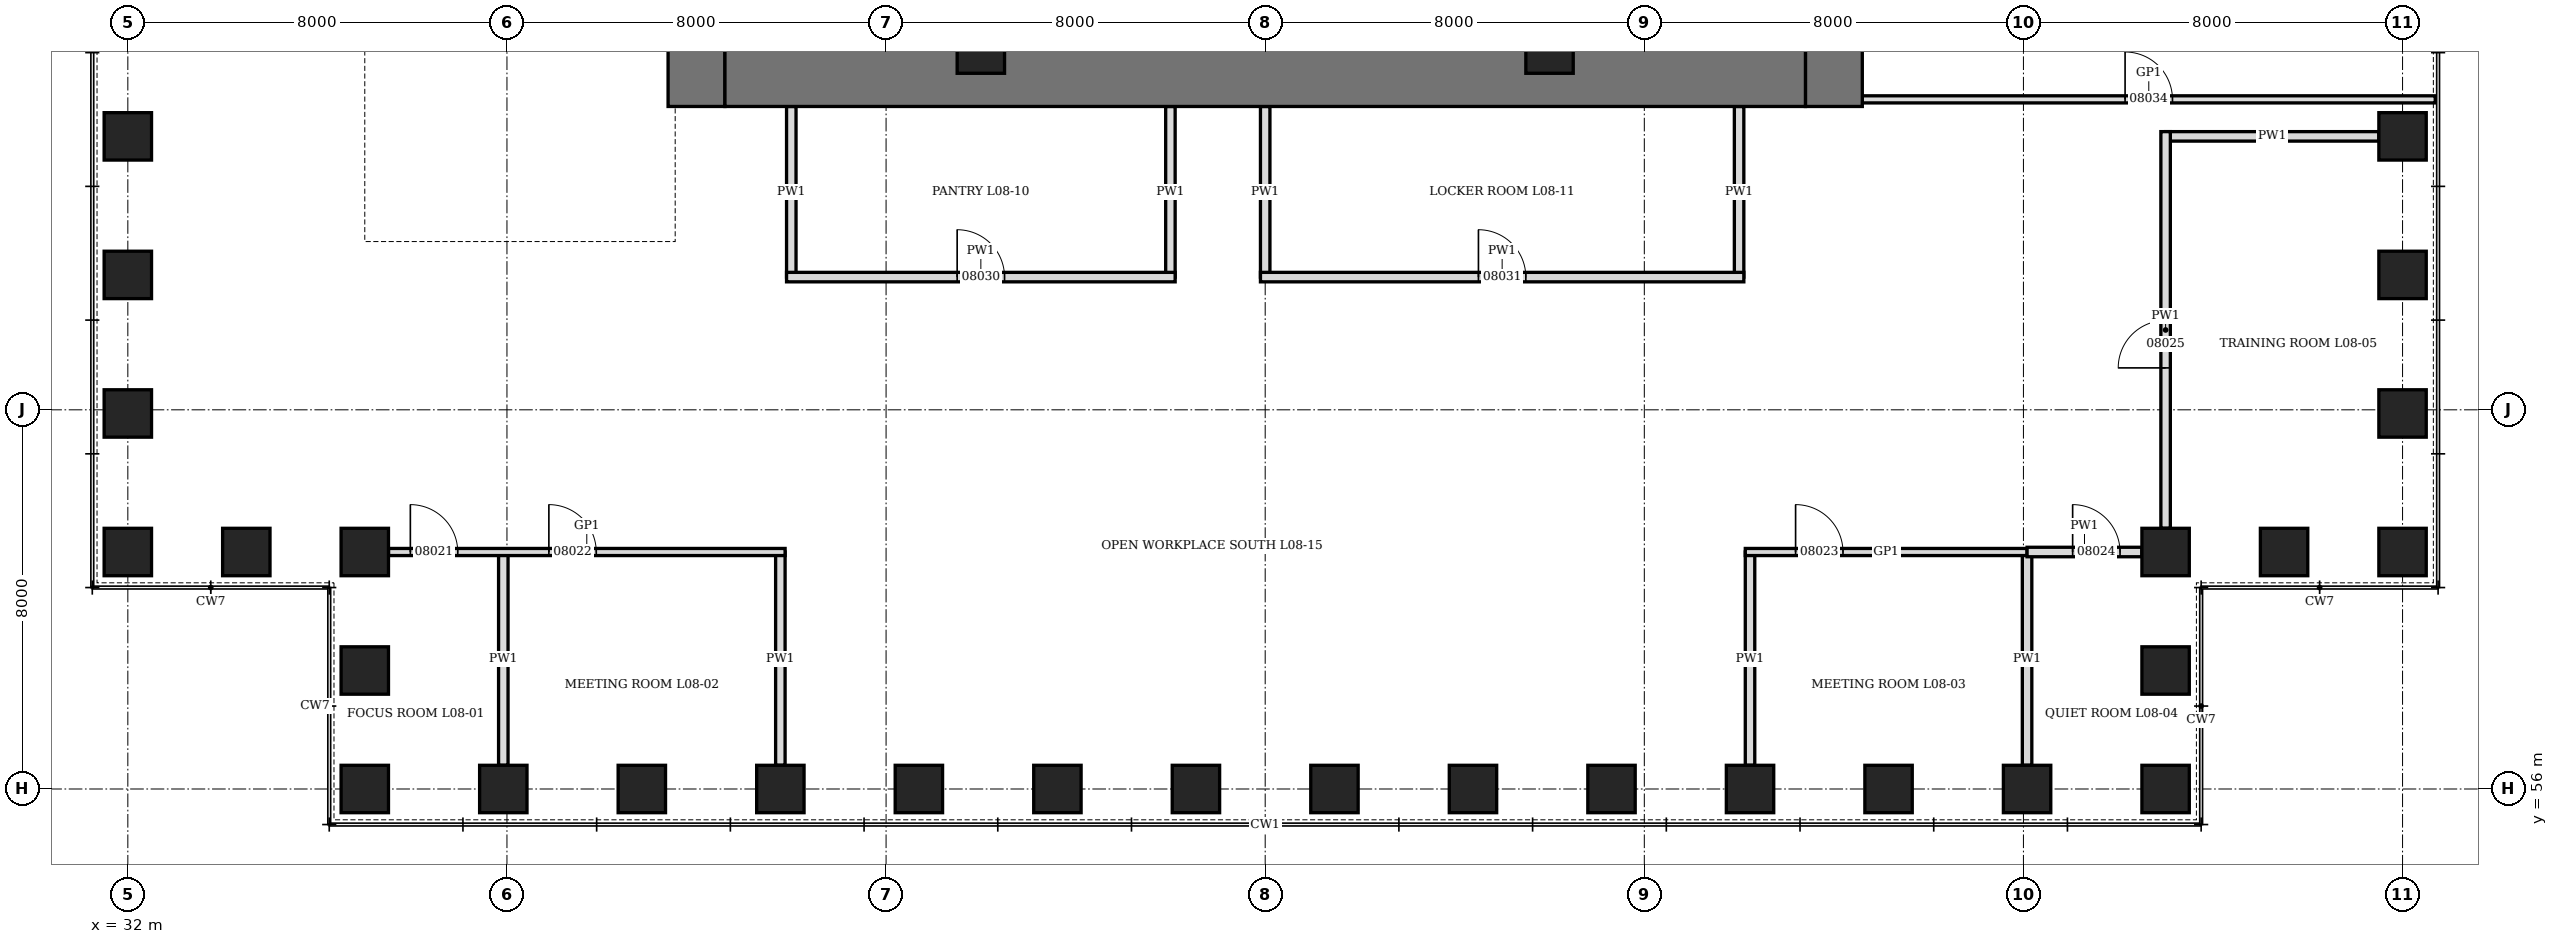
"""IFC4 building model, lengths in metres.
Left out: names, types, materials, properties, quantities, classifications, styles, units other than length and angle.
Written with IfcOpenShell. Run it as: python <this file> out.ifc"""

import sys

from ifc_helpers import new_model, si_unit, direction, frame, frame_2d, origin, origin_2d, place, context, subcontext, project, spatial, rectangle, hollow_rectangle, extrude, element, fill, save


model = new_model("IFC4")
c1 = context("Model", 3, precision=1e-05, world=origin(), true_north=direction((0.0, 1.0)))
c2 = subcontext(c1, "Body", "Model", "MODEL_VIEW")
j1 = project(units=[si_unit("LENGTHUNIT", "METRE"), si_unit("PLANEANGLEUNIT", "RADIAN")], contexts=[c1])
p1 = place(None, origin())
s1 = spatial("IfcSite", under=j1, at=p1, CompositionType="ELEMENT")
p2 = place(p1, origin())
s2 = spatial("IfcBuilding", under=s1, at=p2, CompositionType="ELEMENT")
p3 = place(p2, frame((0.0, 0.0, 43.3)))
s3 = spatial("IfcBuildingStorey", under=s2, at=p3, CompositionType="ELEMENT", Elevation=43.3)
for number, where, z_axis, x_axis in (
    (1, (37.0, 56.0, 0.0), (0.0, 0.0, 1.0), (1.0, 0.0, 0.0)),
    (2, (39.923, 56.0, 0.0), (0.0, 0.0, 1.0), (1.0, 0.0, 0.0)),
    (3, (42.846, 56.0, 0.0), (0.0, 0.0, 1.0), (1.0, 0.0, 0.0)),
    (4, (45.769, 56.0, 0.0), (0.0, 0.0, 1.0), (1.0, 0.0, 0.0)),
    (5, (48.692, 56.0, 0.0), (0.0, 0.0, 1.0), (1.0, 0.0, 0.0)),
    (6, (51.615, 56.0, 0.0), (0.0, 0.0, 1.0), (1.0, 0.0, 0.0)),
    (7, (54.539, 56.0, 0.0), (0.0, 0.0, 1.0), (1.0, 0.0, 0.0)),
    (8, (57.461, 56.0, 0.0), (0.0, 0.0, 1.0), (1.0, 0.0, 0.0)),
    (9, (60.385, 56.0, 0.0), (0.0, 0.0, 1.0), (1.0, 0.0, 0.0)),
    (10, (63.308, 56.0, 0.0), (0.0, 0.0, 1.0), (1.0, 0.0, 0.0)),
    (11, (66.231, 56.0, 0.0), (0.0, 0.0, 1.0), (1.0, 0.0, 0.0)),
    (12, (69.154, 56.0, 0.0), (0.0, 0.0, 1.0), (1.0, 0.0, 0.0)),
    (13, (72.077, 56.0, 0.0), (0.0, 0.0, 1.0), (1.0, 0.0, 0.0)),
    (14, (75.0, 56.0, 0.0), (0.0, 0.0, 1.0), (0.0, 1.0, 0.0)),
    (15, (75.0, 58.5, 0.0), (0.0, 0.0, 1.0), (0.0, 1.0, 0.0)),
    (16, (75.0, 61.0, 0.0), (0.0, 0.0, 1.0), (1.0, 0.0, 0.0)),
    (17, (77.5, 61.0, 0.0), (0.0, 0.0, 1.0), (1.0, 0.0, 0.0)),
    (18, (80.0, 61.0, 0.0), (0.0, 0.0, 1.0), (0.0, 1.0, 0.0)),
    (19, (80.0, 63.923, 0.0), (0.0, 0.0, 1.0), (0.0, 1.0, 0.0)),
    (20, (80.0, 66.846, 0.0), (0.0, 0.0, 1.0), (0.0, 1.0, 0.0)),
    (21, (80.0, 69.769, 0.0), (0.0, 0.0, 1.0), (0.0, 1.0, 0.0)),
    (22, (32.0, 69.769, 0.0), (0.0, 0.0, 1.0), (0.0, 1.0, 0.0)),
    (23, (32.0, 66.846, 0.0), (0.0, 0.0, 1.0), (0.0, 1.0, 0.0)),
    (24, (32.0, 63.923, 0.0), (0.0, 0.0, 1.0), (0.0, 1.0, 0.0)),
    (25, (32.0, 61.0, 0.0), (0.0, 0.0, 1.0), (1.0, 0.0, 0.0)),
    (26, (34.5, 61.0, 0.0), (0.0, 0.0, 1.0), (1.0, 0.0, 0.0)),
    (27, (37.0, 61.0, 0.0), (0.0, 0.0, 1.0), (0.0, 1.0, 0.0)),
    (28, (37.0, 58.5, 0.0), (0.0, 0.0, 1.0), (0.0, 1.0, 0.0)),
):
    element("IfcColumn", number, at=place(p3, frame(where, z_axis=z_axis, x_axis=x_axis)), inside=s3, PredefinedType="COLUMN", context=c2, shape_type="SweptSolid", body=[
        extrude(hollow_rectangle(XDim=1.0, YDim=1.0, WallThickness=0.25, at=origin_2d()), origin(), (0.0, 0.0, 1.0), 4.2),
    ])
p4 = place(p3, frame((44.0, 70.4, 0.0), z_axis=(0.0, 0.0, 1.0), x_axis=(0.0, 1.0, 0.0)))
e29 = element("IfcWall", 29, at=p4, inside=s3, PredefinedType="SHEAR", context=c2, shape_type="SweptSolid", body=[
    extrude(rectangle(XDim=19.2, YDim=1.2, at=frame_2d((9.6, 0.0))), origin(), (0.0, 0.0, 1.0), 4.2),
])
p5 = place(p4, frame((8.6, 0.0, 0.0)))
e30 = element("IfcOpeningElement", 30, at=p5, cuts=e29, PredefinedType="OPENING", context=c2, shape_type="SweptSolid", body=[
    extrude(rectangle(XDim=2.0, YDim=2.4, at=frame_2d((1.0, 1.2))), frame((0.0, 0.61, 0.0), z_axis=(0.0, -1.0, 0.0), x_axis=(1.0, 0.0, 0.0)), (0.0, 0.0, 1.0), 1.22),
])
p6 = place(p3, frame((68.0, 70.4, 0.0), z_axis=(0.0, 0.0, 1.0), x_axis=(0.0, 1.0, 0.0)))
e31 = element("IfcWall", 31, at=p6, inside=s3, PredefinedType="SHEAR", context=c2, shape_type="SweptSolid", body=[
    extrude(rectangle(XDim=19.2, YDim=1.2, at=frame_2d((9.6, 0.0))), origin(), (0.0, 0.0, 1.0), 4.2),
])
p7 = place(p6, frame((8.6, 0.0, 0.0)))
e32 = element("IfcOpeningElement", 32, at=p7, cuts=e31, PredefinedType="OPENING", context=c2, shape_type="SweptSolid", body=[
    extrude(rectangle(XDim=2.0, YDim=2.4, at=frame_2d((1.0, 1.2))), frame((0.0, 0.61, 0.0), z_axis=(0.0, -1.0, 0.0), x_axis=(1.0, 0.0, 0.0)), (0.0, 0.0, 1.0), 1.22),
])
p8 = place(p3, frame((44.6, 71.0, 0.0), z_axis=(0.0, 0.0, 1.0), x_axis=(1.0, 0.0, 0.0)))
e33 = element("IfcWall", 33, at=p8, inside=s3, PredefinedType="SHEAR", context=c2, shape_type="SweptSolid", body=[
    extrude(rectangle(XDim=22.8, YDim=1.2, at=frame_2d((11.4, 0.0))), origin(), (0.0, 0.0, 1.0), 4.2),
])
for number, where, z_axis, x_axis in (
    (34, (50.0, 71.6, 0.0), (0.0, 0.0, 1.0), (1.0, 0.0, 0.0)),
    (35, (62.0, 71.6, 0.0), (0.0, 0.0, 1.0), (1.0, 0.0, 0.0)),
):
    element("IfcColumn", number, at=place(p3, frame(where, z_axis=z_axis, x_axis=x_axis)), inside=s3, PredefinedType="COLUMN", context=c2, shape_type="SweptSolid", body=[
        extrude(hollow_rectangle(XDim=1.0, YDim=1.0, WallThickness=0.15, at=origin_2d()), origin(), (0.0, 0.0, 1.0), 4.2),
    ])
p9 = place(p3, frame((39.923, 56.5, 0.0), z_axis=(0.0, 0.0, 1.0), x_axis=(0.0, 1.0, 0.0)))
e36 = element("IfcWall", 36, at=p9, inside=s3, PredefinedType="PARTITIONING", context=c2, shape_type="SweptSolid", body=[
    extrude(rectangle(XDim=4.5, YDim=0.2, at=frame_2d((2.25, 0.0))), origin(), (0.0, 0.0, 1.0), 3.428),
])
for number, where, z_axis, x_axis in (
    (37, (45.769, 56.5, 0.0), (0.0, 0.0, 1.0), (0.0, 1.0, 0.0)),
    (38, (66.231, 56.5, 0.0), (0.0, 0.0, 1.0), (0.0, 1.0, 0.0)),
):
    element("IfcWall", number, at=place(p3, frame(where, z_axis=z_axis, x_axis=x_axis)), inside=s3, PredefinedType="PARTITIONING", context=c2, shape_type="SweptSolid", body=[
        extrude(rectangle(XDim=4.5, YDim=0.2, at=frame_2d((2.25, 0.0))), origin(), (0.0, 0.0, 1.0), 3.278),
    ])
for number, where, z_axis, x_axis in (
    (39, (72.077, 56.5, 0.0), (0.0, 0.0, 1.0), (0.0, 1.0, 0.0)),
    (40, (75.0, 69.769, 0.0), (0.0, 0.0, 1.0), (1.0, 0.0, 0.0)),
):
    element("IfcWall", number, at=place(p3, frame(where, z_axis=z_axis, x_axis=x_axis)), inside=s3, PredefinedType="PARTITIONING", context=c2, shape_type="SweptSolid", body=[
        extrude(rectangle(XDim=4.5, YDim=0.2, at=frame_2d((2.25, 0.0))), origin(), (0.0, 0.0, 1.0), 3.428),
    ])
for number, where, z_axis, x_axis in (
    (41, (46.0, 66.8, 0.0), (0.0, 0.0, 1.0), (0.0, 1.0, 0.0)),
    (42, (54.0, 66.8, 0.0), (0.0, 0.0, 1.0), (0.0, 1.0, 0.0)),
    (43, (56.0, 66.8, 0.0), (0.0, 0.0, 1.0), (0.0, 1.0, 0.0)),
    (44, (66.0, 66.8, 0.0), (0.0, 0.0, 1.0), (0.0, 1.0, 0.0)),
):
    element("IfcWall", number, at=place(p3, frame(where, z_axis=z_axis, x_axis=x_axis)), inside=s3, PredefinedType="PARTITIONING", context=c2, shape_type="SweptSolid", body=[
        extrude(rectangle(XDim=3.6, YDim=0.2, at=frame_2d((1.8, 0.0))), origin(), (0.0, 0.0, 1.0), 4.04),
    ])
p10 = place(p3, frame((37.5, 61.0, 0.0), z_axis=(0.0, 0.0, 1.0), x_axis=(1.0, 0.0, 0.0)))
e45 = element("IfcWall", 45, at=p10, inside=s3, PredefinedType="PARTITIONING", context=c2, shape_type="SweptSolid", body=[
    extrude(rectangle(XDim=8.369, YDim=0.15, at=frame_2d((4.185, 0.0))), origin(), (0.0, 0.0, 1.0), 4.04),
])
p11 = place(p10, frame((0.461, 0.0, 0.0)))
e46 = element("IfcOpeningElement", 46, at=p11, cuts=e45, PredefinedType="OPENING", context=c2, shape_type="SweptSolid", body=[
    extrude(rectangle(XDim=1.0, YDim=2.4, at=frame_2d((0.5, 1.2))), frame((0.0, 0.085, 0.0), z_axis=(0.0, -1.0, 0.0), x_axis=(1.0, 0.0, 0.0)), (0.0, 0.0, 1.0), 0.17),
])
p12 = place(p10, frame((3.385, 0.0, 0.0)))
e47 = element("IfcOpeningElement", 47, at=p12, cuts=e45, PredefinedType="OPENING", context=c2, shape_type="SweptSolid", body=[
    extrude(rectangle(XDim=1.0, YDim=2.4, at=frame_2d((0.5, 1.2))), frame((0.0, 0.085, 0.0), z_axis=(0.0, -1.0, 0.0), x_axis=(1.0, 0.0, 0.0)), (0.0, 0.0, 1.0), 0.17),
])
p13 = place(p3, frame((66.131, 61.0, 0.0), z_axis=(0.0, 0.0, 1.0), x_axis=(1.0, 0.0, 0.0)))
e48 = element("IfcWall", 48, at=p13, inside=s3, PredefinedType="PARTITIONING", context=c2, shape_type="SweptSolid", body=[
    extrude(rectangle(XDim=5.946, YDim=0.15, at=frame_2d((2.973, 0.0))), origin(), (0.0, 0.0, 1.0), 4.04),
])
p14 = place(p13, frame((1.062, 0.0, 0.0)))
e49 = element("IfcOpeningElement", 49, at=p14, cuts=e48, PredefinedType="OPENING", context=c2, shape_type="SweptSolid", body=[
    extrude(rectangle(XDim=1.0, YDim=2.4, at=frame_2d((0.5, 1.2))), frame((0.0, 0.085, 0.0), z_axis=(0.0, -1.0, 0.0), x_axis=(1.0, 0.0, 0.0)), (0.0, 0.0, 1.0), 0.17),
])
p15 = place(p3, frame((72.077, 61.0, 0.0), z_axis=(0.0, 0.0, 1.0), x_axis=(1.0, 0.0, 0.0)))
e50 = element("IfcWall", 50, at=p15, inside=s3, PredefinedType="PARTITIONING", context=c2, shape_type="SweptSolid", body=[
    extrude(rectangle(XDim=2.423, YDim=0.2, at=frame_2d((1.211, 0.0))), origin(), (0.0, 0.0, 1.0), 4.04),
])
p16 = place(p15, frame((0.961, 0.0, 0.0)))
e51 = element("IfcOpeningElement", 51, at=p16, cuts=e50, PredefinedType="OPENING", context=c2, shape_type="SweptSolid", body=[
    extrude(rectangle(XDim=1.0, YDim=2.1, at=frame_2d((0.5, 1.05))), frame((0.0, 0.11, 0.0), z_axis=(0.0, -1.0, 0.0), x_axis=(1.0, 0.0, 0.0)), (0.0, 0.0, 1.0), 0.22),
])
p17 = place(p3, frame((45.9, 66.8, 0.0), z_axis=(0.0, 0.0, 1.0), x_axis=(1.0, 0.0, 0.0)))
e52 = element("IfcWall", 52, at=p17, inside=s3, PredefinedType="PARTITIONING", context=c2, shape_type="SweptSolid", body=[
    extrude(rectangle(XDim=8.2, YDim=0.2, at=frame_2d((4.1, 0.0))), origin(), (0.0, 0.0, 1.0), 4.04),
])
p18 = place(p17, frame((3.6, 0.0, 0.0)))
e53 = element("IfcOpeningElement", 53, at=p18, cuts=e52, PredefinedType="OPENING", context=c2, shape_type="SweptSolid", body=[
    extrude(rectangle(XDim=1.0, YDim=2.1, at=frame_2d((0.5, 1.05))), frame((0.0, 0.11, 0.0), z_axis=(0.0, -1.0, 0.0), x_axis=(1.0, 0.0, 0.0)), (0.0, 0.0, 1.0), 0.22),
])
p19 = place(p3, frame((55.9, 66.8, 0.0), z_axis=(0.0, 0.0, 1.0), x_axis=(1.0, 0.0, 0.0)))
e54 = element("IfcWall", 54, at=p19, inside=s3, PredefinedType="PARTITIONING", context=c2, shape_type="SweptSolid", body=[
    extrude(rectangle(XDim=10.2, YDim=0.2, at=frame_2d((5.1, 0.0))), origin(), (0.0, 0.0, 1.0), 4.04),
])
p20 = place(p19, frame((4.6, 0.0, 0.0)))
e55 = element("IfcOpeningElement", 55, at=p20, cuts=e54, PredefinedType="OPENING", context=c2, shape_type="SweptSolid", body=[
    extrude(rectangle(XDim=1.0, YDim=2.1, at=frame_2d((0.5, 1.05))), frame((0.0, 0.11, 0.0), z_axis=(0.0, -1.0, 0.0), x_axis=(1.0, 0.0, 0.0)), (0.0, 0.0, 1.0), 0.22),
])
p21 = place(p3, frame((68.6, 70.55, 0.0), z_axis=(0.0, 0.0, 1.0), x_axis=(1.0, 0.0, 0.0)))
e56 = element("IfcWall", 56, at=p21, inside=s3, PredefinedType="PARTITIONING", context=c2, shape_type="SweptSolid", body=[
    extrude(rectangle(XDim=12.09, YDim=0.15, at=frame_2d((6.045, 0.0))), origin(), (0.0, 0.0, 1.0), 4.04),
])
p22 = place(p21, frame((5.545, 0.0, 0.0)))
e57 = element("IfcOpeningElement", 57, at=p22, cuts=e56, PredefinedType="OPENING", context=c2, shape_type="SweptSolid", body=[
    extrude(rectangle(XDim=1.0, YDim=2.4, at=frame_2d((0.5, 1.2))), frame((0.0, 0.085, 0.0), z_axis=(0.0, -1.0, 0.0), x_axis=(1.0, 0.0, 0.0)), (0.0, 0.0, 1.0), 0.17),
])
p23 = place(p3, frame((75.0, 61.5, 0.0), z_axis=(0.0, 0.0, 1.0), x_axis=(0.0, 1.0, 0.0)))
e58 = element("IfcWall", 58, at=p23, inside=s3, PredefinedType="PARTITIONING", context=c2, shape_type="SweptSolid", body=[
    extrude(rectangle(XDim=8.369, YDim=0.2, at=frame_2d((4.185, 0.0))), origin(), (0.0, 0.0, 1.0), 4.04),
])
p24 = place(p23, frame((3.385, 0.0, 0.0)))
e59 = element("IfcOpeningElement", 59, at=p24, cuts=e58, PredefinedType="OPENING", context=c2, shape_type="SweptSolid", body=[
    extrude(rectangle(XDim=1.0, YDim=2.1, at=frame_2d((0.5, 1.05))), frame((0.0, 0.11, 0.0), z_axis=(0.0, -1.0, 0.0), x_axis=(1.0, 0.0, 0.0)), (0.0, 0.0, 1.0), 0.22),
])
p25 = place(p11, origin())
e60 = element("IfcDoor", 60, at=p25, inside=s3, OperationType="SINGLE_SWING_RIGHT", PredefinedType="DOOR", context=c2, shape_type="SweptSolid", body=[
    extrude(rectangle(XDim=1.0, YDim=2.4, at=frame_2d((0.5, 1.2))), frame((0.0, 0.075, 0.0), z_axis=(0.0, -1.0, 0.0), x_axis=(1.0, 0.0, 0.0)), (0.0, 0.0, 1.0), 0.149),
])
fill(e46, e60)
p26 = place(p12, origin())
e61 = element("IfcDoor", 61, at=p26, inside=s3, OperationType="SINGLE_SWING_RIGHT", PredefinedType="DOOR", context=c2, shape_type="SweptSolid", body=[
    extrude(rectangle(XDim=1.0, YDim=2.4, at=frame_2d((0.5, 1.2))), frame((0.0, 0.075, 0.0), z_axis=(0.0, -1.0, 0.0), x_axis=(1.0, 0.0, 0.0)), (0.0, 0.0, 1.0), 0.149),
])
fill(e47, e61)
p27 = place(p14, origin())
e62 = element("IfcDoor", 62, at=p27, inside=s3, OperationType="SINGLE_SWING_RIGHT", PredefinedType="DOOR", context=c2, shape_type="SweptSolid", body=[
    extrude(rectangle(XDim=1.0, YDim=2.4, at=frame_2d((0.5, 1.2))), frame((0.0, 0.075, 0.0), z_axis=(0.0, -1.0, 0.0), x_axis=(1.0, 0.0, 0.0)), (0.0, 0.0, 1.0), 0.149),
])
fill(e49, e62)
p28 = place(p16, origin())
e63 = element("IfcDoor", 63, at=p28, inside=s3, OperationType="SINGLE_SWING_LEFT", PredefinedType="DOOR", context=c2, shape_type="SweptSolid", body=[
    extrude(rectangle(XDim=1.0, YDim=2.1, at=frame_2d((0.5, 1.05))), frame((0.0, 0.1, 0.0), z_axis=(0.0, -1.0, 0.0), x_axis=(1.0, 0.0, 0.0)), (0.0, 0.0, 1.0), 0.199),
])
fill(e51, e63)
p29 = place(p24, origin())
e64 = element("IfcDoor", 64, at=p29, inside=s3, OperationType="SINGLE_SWING_LEFT", PredefinedType="DOOR", context=c2, shape_type="SweptSolid", body=[
    extrude(rectangle(XDim=1.0, YDim=2.1, at=frame_2d((0.5, 1.05))), frame((0.0, 0.1, 0.0), z_axis=(0.0, -1.0, 0.0), x_axis=(1.0, 0.0, 0.0)), (0.0, 0.0, 1.0), 0.199),
])
fill(e59, e64)
p30 = place(p18, origin())
e65 = element("IfcDoor", 65, at=p30, inside=s3, OperationType="SINGLE_SWING_LEFT", PredefinedType="DOOR", context=c2, shape_type="SweptSolid", body=[
    extrude(rectangle(XDim=1.0, YDim=2.1, at=frame_2d((0.5, 1.05))), frame((0.0, 0.1, 0.0), z_axis=(0.0, -1.0, 0.0), x_axis=(1.0, 0.0, 0.0)), (0.0, 0.0, 1.0), 0.199),
])
fill(e53, e65)
p31 = place(p20, origin())
e66 = element("IfcDoor", 66, at=p31, inside=s3, OperationType="SINGLE_SWING_LEFT", PredefinedType="DOOR", context=c2, shape_type="SweptSolid", body=[
    extrude(rectangle(XDim=1.0, YDim=2.1, at=frame_2d((0.5, 1.05))), frame((0.0, 0.1, 0.0), z_axis=(0.0, -1.0, 0.0), x_axis=(1.0, 0.0, 0.0)), (0.0, 0.0, 1.0), 0.199),
])
fill(e55, e66)
p32 = place(p22, origin())
e67 = element("IfcDoor", 67, at=p32, inside=s3, OperationType="SINGLE_SWING_RIGHT", PredefinedType="DOOR", context=c2, shape_type="SweptSolid", body=[
    extrude(rectangle(XDim=1.0, YDim=2.4, at=frame_2d((0.5, 1.2))), frame((0.0, 0.075, 0.0), z_axis=(0.0, -1.0, 0.0), x_axis=(1.0, 0.0, 0.0)), (0.0, 0.0, 1.0), 0.149),
])
fill(e57, e67)
save(model, sys.argv[1])
